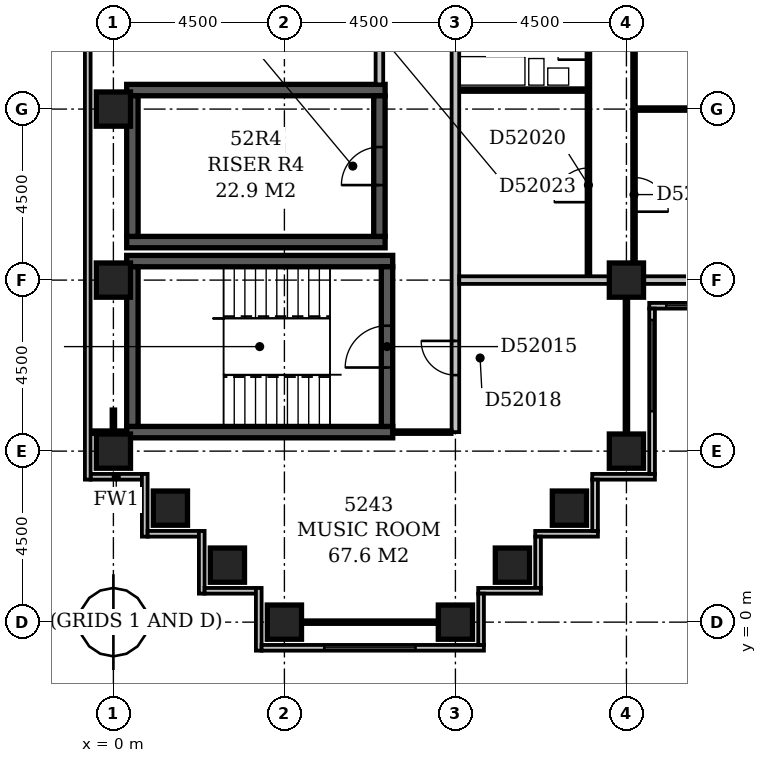
"""IFC4 building model, lengths in metres.
Left out: names, types, materials, properties, quantities, classifications, styles, units other than length and angle.
Written with IfcOpenShell. Run it as: python <this file> out.ifc"""

import sys

from ifc_helpers import new_model, si_unit, direction, frame, frame_2d, origin, origin_2d, place, context, subcontext, project, spatial, rectangle, extrude, element, fill, save


model = new_model("IFC4")
c1 = context("Model", 3, precision=1e-05, world=origin(), true_north=direction((0.0, 1.0)))
c2 = subcontext(c1, "Body", "Model", "MODEL_VIEW")
j1 = project(units=[si_unit("LENGTHUNIT", "METRE"), si_unit("PLANEANGLEUNIT", "RADIAN")], contexts=[c1])
p1 = place(None, origin())
s1 = spatial("IfcSite", under=j1, at=p1, CompositionType="ELEMENT")
p2 = place(p1, origin())
s2 = spatial("IfcBuilding", under=s1, at=p2, CompositionType="ELEMENT")
p3 = place(p2, frame((0.0, 0.0, 204.2)))
s3 = spatial("IfcBuildingStorey", under=s2, at=p3, CompositionType="ELEMENT", Elevation=204.2)
for number, where, z_axis, x_axis in (
    (1, (0.35, 5.0, -0.3), (0.0, 0.0, 1.0), (1.0, 0.0, 0.0)),
    (2, (0.35, 9.5, -0.3), (0.0, 0.0, 1.0), (1.0, 0.0, 0.0)),
):
    element("IfcWall", number, at=place(p3, frame(where, z_axis=z_axis, x_axis=x_axis)), inside=s3, PredefinedType="SHEAR", context=c2, shape_type="SweptSolid", body=[
        extrude(rectangle(XDim=7.0, YDim=0.3, at=frame_2d((3.5, 0.0))), origin(), (0.0, 0.0, 1.0), 3.6),
    ])
for number, where, z_axis, x_axis in (
    (3, (0.35, 10.0, -0.3), (0.0, 0.0, 1.0), (1.0, 0.0, 0.0)),
    (4, (0.35, 14.0, -0.3), (0.0, 0.0, 1.0), (1.0, 0.0, 0.0)),
):
    element("IfcWall", number, at=place(p3, frame(where, z_axis=z_axis, x_axis=x_axis)), inside=s3, PredefinedType="SHEAR", context=c2, shape_type="SweptSolid", body=[
        extrude(rectangle(XDim=6.8, YDim=0.3, at=frame_2d((3.4, 0.0))), origin(), (0.0, 0.0, 1.0), 3.6),
    ])
p4 = place(p3, frame((0.5, 5.15, -0.3), z_axis=(0.0, 0.0, 1.0), x_axis=(0.0, 1.0, 0.0)))
e5 = element("IfcWall", 5, at=p4, inside=s3, PredefinedType="SHEAR", context=c2, shape_type="SweptSolid", body=[
    extrude(rectangle(XDim=4.2, YDim=0.3, at=frame_2d((2.1, 0.0))), origin(), (0.0, 0.0, 1.0), 3.6),
])
p5 = place(p3, frame((0.5, 10.15, -0.3), z_axis=(0.0, 0.0, 1.0), x_axis=(0.0, 1.0, 0.0)))
e6 = element("IfcWall", 6, at=p5, inside=s3, PredefinedType="SHEAR", context=c2, shape_type="SweptSolid", body=[
    extrude(rectangle(XDim=3.7, YDim=0.3, at=frame_2d((1.85, 0.0))), origin(), (0.0, 0.0, 1.0), 3.6),
])
p6 = place(p3, frame((7.0, 10.15, -0.3), z_axis=(0.0, 0.0, 1.0), x_axis=(0.0, 1.0, 0.0)))
e7 = element("IfcWall", 7, at=p6, inside=s3, PredefinedType="SHEAR", context=c2, shape_type="SweptSolid", body=[
    extrude(rectangle(XDim=3.7, YDim=0.3, at=frame_2d((1.85, 0.0))), origin(), (0.0, 0.0, 1.0), 3.6),
])
p7 = place(p6, frame((1.35, 0.0, 0.3)))
e8 = element("IfcOpeningElement", 8, at=p7, cuts=e7, PredefinedType="OPENING", context=c2, shape_type="SweptSolid", body=[
    extrude(rectangle(XDim=1.0, YDim=2.1, at=frame_2d((0.5, 1.05))), frame((0.0, 0.162, 0.0), z_axis=(0.0, -1.0, 0.0), x_axis=(1.0, 0.0, 0.0)), (0.0, 0.0, 1.0), 0.324),
])
p8 = place(p3, frame((7.2, 5.15, -0.3), z_axis=(0.0, 0.0, 1.0), x_axis=(0.0, 1.0, 0.0)))
e9 = element("IfcWall", 9, at=p8, inside=s3, PredefinedType="SHEAR", context=c2, shape_type="SweptSolid", body=[
    extrude(rectangle(XDim=4.2, YDim=0.3, at=frame_2d((2.1, 0.0))), origin(), (0.0, 0.0, 1.0), 3.6),
])
p9 = place(p8, frame((1.55, 0.0, 0.3)))
e10 = element("IfcOpeningElement", 10, at=p9, cuts=e9, PredefinedType="OPENING", context=c2, shape_type="SweptSolid", body=[
    extrude(rectangle(XDim=1.1, YDim=2.1, at=frame_2d((0.55, 1.05))), frame((0.0, 0.162, 0.0), z_axis=(0.0, -1.0, 0.0), x_axis=(1.0, 0.0, 0.0)), (0.0, 0.0, 1.0), 0.324),
])
for number, where, z_axis, x_axis in (
    (11, (4.5, 0.0, -0.3), (0.0, 0.0, 1.0), (1.0, 0.0, 0.0)),
    (12, (9.0, 0.0, -0.3), (0.0, 0.0, 1.0), (1.0, 0.0, 0.0)),
    (13, (3.0, 1.5, -0.3), (0.0, 0.0, 1.0), (1.0, 0.0, 0.0)),
    (14, (10.5, 1.5, -0.3), (0.0, 0.0, 1.0), (1.0, 0.0, 0.0)),
    (15, (1.5, 3.0, -0.3), (0.0, 0.0, 1.0), (1.0, 0.0, 0.0)),
    (16, (12.0, 3.0, -0.3), (0.0, 0.0, 1.0), (1.0, 0.0, 0.0)),
    (17, (0.0, 4.5, -0.3), (0.0, 0.0, 1.0), (1.0, 0.0, 0.0)),
    (18, (13.5, 4.5, -0.3), (0.0, 0.0, 1.0), (1.0, 0.0, 0.0)),
    (19, (0.0, 9.0, -0.3), (0.0, 0.0, 1.0), (1.0, 0.0, 0.0)),
    (20, (13.5, 9.0, -0.3), (0.0, 0.0, 1.0), (1.0, 0.0, 0.0)),
    (21, (0.0, 13.5, -0.3), (0.0, 0.0, 1.0), (1.0, 0.0, 0.0)),
):
    element("IfcColumn", number, at=place(p3, frame(where, z_axis=z_axis, x_axis=x_axis)), inside=s3, PredefinedType="COLUMN", context=c2, shape_type="SweptSolid", body=[
        extrude(rectangle(XDim=0.9, YDim=0.9, at=origin_2d()), origin(), (0.0, 0.0, 1.0), 3.6),
    ])
p10 = place(p3, frame((-0.6, 3.825, 0.0), z_axis=(0.0, 0.0, 1.0), x_axis=(1.0, 0.0, 0.0)))
e22 = element("IfcWall", 22, at=p10, inside=s3, PredefinedType="STANDARD", context=c2, shape_type="SweptSolid", body=[
    extrude(rectangle(XDim=1.35, YDim=0.15, at=frame_2d((0.675, 0.0))), origin(), (0.0, 0.0, 1.0), 2.7),
])
p11 = place(p3, frame((0.825, 3.9, 0.0), z_axis=(0.0, 0.0, 1.0), x_axis=(0.0, -1.0, 0.0)))
e23 = element("IfcWall", 23, at=p11, inside=s3, PredefinedType="STANDARD", context=c2, shape_type="SweptSolid", body=[
    extrude(rectangle(XDim=1.65, YDim=0.15, at=frame_2d((0.825, 0.0))), origin(), (0.0, 0.0, 1.0), 2.7),
])
p12 = place(p3, frame((0.9, 2.325, 0.0), z_axis=(0.0, 0.0, 1.0), x_axis=(1.0, 0.0, 0.0)))
e24 = element("IfcWall", 24, at=p12, inside=s3, PredefinedType="STANDARD", context=c2, shape_type="SweptSolid", body=[
    extrude(rectangle(XDim=1.35, YDim=0.15, at=frame_2d((0.675, 0.0))), origin(), (0.0, 0.0, 1.0), 2.7),
])
p13 = place(p3, frame((2.325, 2.4, 0.0), z_axis=(0.0, 0.0, 1.0), x_axis=(0.0, -1.0, 0.0)))
e25 = element("IfcWall", 25, at=p13, inside=s3, PredefinedType="STANDARD", context=c2, shape_type="SweptSolid", body=[
    extrude(rectangle(XDim=1.65, YDim=0.15, at=frame_2d((0.825, 0.0))), origin(), (0.0, 0.0, 1.0), 2.7),
])
p14 = place(p3, frame((2.4, 0.825, 0.0), z_axis=(0.0, 0.0, 1.0), x_axis=(1.0, 0.0, 0.0)))
e26 = element("IfcWall", 26, at=p14, inside=s3, PredefinedType="STANDARD", context=c2, shape_type="SweptSolid", body=[
    extrude(rectangle(XDim=1.35, YDim=0.15, at=frame_2d((0.675, 0.0))), origin(), (0.0, 0.0, 1.0), 2.7),
])
p15 = place(p3, frame((3.825, 0.9, 0.0), z_axis=(0.0, 0.0, 1.0), x_axis=(0.0, -1.0, 0.0)))
e27 = element("IfcWall", 27, at=p15, inside=s3, PredefinedType="STANDARD", context=c2, shape_type="SweptSolid", body=[
    extrude(rectangle(XDim=1.65, YDim=0.15, at=frame_2d((0.825, 0.0))), origin(), (0.0, 0.0, 1.0), 2.7),
])
p16 = place(p3, frame((3.9, -0.675, 0.0), z_axis=(0.0, 0.0, 1.0), x_axis=(1.0, 0.0, 0.0)))
e28 = element("IfcWall", 28, at=p16, inside=s3, PredefinedType="STANDARD", context=c2, shape_type="SweptSolid", body=[
    extrude(rectangle(XDim=5.85, YDim=0.15, at=frame_2d((2.925, 0.0))), origin(), (0.0, 0.0, 1.0), 2.7),
])
p17 = place(p16, frame((1.65, 0.0, 0.6)))
e29 = element("IfcOpeningElement", 29, at=p17, cuts=e28, PredefinedType="OPENING", context=c2, shape_type="SweptSolid", body=[
    extrude(rectangle(XDim=2.4, YDim=1.8, at=frame_2d((1.2, 0.9))), frame((0.0, 0.087, 0.0), z_axis=(0.0, -1.0, 0.0), x_axis=(1.0, 0.0, 0.0)), (0.0, 0.0, 1.0), 0.174),
])
p18 = place(p3, frame((9.675, -0.6, 0.0), z_axis=(0.0, 0.0, 1.0), x_axis=(0.0, 1.0, 0.0)))
e30 = element("IfcWall", 30, at=p18, inside=s3, PredefinedType="STANDARD", context=c2, shape_type="SweptSolid", body=[
    extrude(rectangle(XDim=1.35, YDim=0.15, at=frame_2d((0.675, 0.0))), origin(), (0.0, 0.0, 1.0), 2.7),
])
p19 = place(p3, frame((9.6, 0.825, 0.0), z_axis=(0.0, 0.0, 1.0), x_axis=(1.0, 0.0, 0.0)))
e31 = element("IfcWall", 31, at=p19, inside=s3, PredefinedType="STANDARD", context=c2, shape_type="SweptSolid", body=[
    extrude(rectangle(XDim=1.65, YDim=0.15, at=frame_2d((0.825, 0.0))), origin(), (0.0, 0.0, 1.0), 2.7),
])
p20 = place(p3, frame((11.175, 0.9, 0.0), z_axis=(0.0, 0.0, 1.0), x_axis=(0.0, 1.0, 0.0)))
e32 = element("IfcWall", 32, at=p20, inside=s3, PredefinedType="STANDARD", context=c2, shape_type="SweptSolid", body=[
    extrude(rectangle(XDim=1.35, YDim=0.15, at=frame_2d((0.675, 0.0))), origin(), (0.0, 0.0, 1.0), 2.7),
])
p21 = place(p3, frame((11.1, 2.325, 0.0), z_axis=(0.0, 0.0, 1.0), x_axis=(1.0, 0.0, 0.0)))
e33 = element("IfcWall", 33, at=p21, inside=s3, PredefinedType="STANDARD", context=c2, shape_type="SweptSolid", body=[
    extrude(rectangle(XDim=1.65, YDim=0.15, at=frame_2d((0.825, 0.0))), origin(), (0.0, 0.0, 1.0), 2.7),
])
p22 = place(p3, frame((12.675, 2.4, 0.0), z_axis=(0.0, 0.0, 1.0), x_axis=(0.0, 1.0, 0.0)))
e34 = element("IfcWall", 34, at=p22, inside=s3, PredefinedType="STANDARD", context=c2, shape_type="SweptSolid", body=[
    extrude(rectangle(XDim=1.35, YDim=0.15, at=frame_2d((0.675, 0.0))), origin(), (0.0, 0.0, 1.0), 2.7),
])
p23 = place(p3, frame((12.6, 3.825, 0.0), z_axis=(0.0, 0.0, 1.0), x_axis=(1.0, 0.0, 0.0)))
e35 = element("IfcWall", 35, at=p23, inside=s3, PredefinedType="STANDARD", context=c2, shape_type="SweptSolid", body=[
    extrude(rectangle(XDim=1.65, YDim=0.15, at=frame_2d((0.825, 0.0))), origin(), (0.0, 0.0, 1.0), 2.7),
])
p24 = place(p3, frame((14.175, 3.9, 0.0), z_axis=(0.0, 0.0, 1.0), x_axis=(0.0, 1.0, 0.0)))
e36 = element("IfcWall", 36, at=p24, inside=s3, PredefinedType="STANDARD", context=c2, shape_type="SweptSolid", body=[
    extrude(rectangle(XDim=4.35, YDim=0.15, at=frame_2d((2.175, 0.0))), origin(), (0.0, 0.0, 1.0), 2.7),
])
p25 = place(p24, frame((1.65, 0.0, 0.6)))
e37 = element("IfcOpeningElement", 37, at=p25, cuts=e36, PredefinedType="OPENING", context=c2, shape_type="SweptSolid", body=[
    extrude(rectangle(XDim=2.4, YDim=1.8, at=frame_2d((1.2, 0.9))), frame((0.0, 0.087, 0.0), z_axis=(0.0, -1.0, 0.0), x_axis=(1.0, 0.0, 0.0)), (0.0, 0.0, 1.0), 0.174),
])
p26 = place(p3, frame((14.1, 8.325, 0.0), z_axis=(0.0, 0.0, 1.0), x_axis=(1.0, 0.0, 0.0)))
e38 = element("IfcWall", 38, at=p26, inside=s3, PredefinedType="STANDARD", context=c2, shape_type="SweptSolid", body=[
    extrude(rectangle(XDim=4.65, YDim=0.15, at=frame_2d((2.325, 0.0))), origin(), (0.0, 0.0, 1.0), 2.7),
])
p27 = place(p26, frame((0.45, 0.0, 0.6)))
e39 = element("IfcOpeningElement", 39, at=p27, cuts=e38, PredefinedType="OPENING", context=c2, shape_type="SweptSolid", body=[
    extrude(rectangle(XDim=2.4, YDim=1.8, at=frame_2d((1.2, 0.9))), frame((0.0, 0.087, 0.0), z_axis=(0.0, -1.0, 0.0), x_axis=(1.0, 0.0, 0.0)), (0.0, 0.0, 1.0), 0.174),
])
p28 = place(p3, frame((-0.675, 59.1, 0.0), z_axis=(0.0, 0.0, 1.0), x_axis=(0.0, -1.0, 0.0)))
e40 = element("IfcWall", 40, at=p28, inside=s3, PredefinedType="STANDARD", context=c2, shape_type="SweptSolid", body=[
    extrude(rectangle(XDim=55.35, YDim=0.15, at=frame_2d((27.675, 0.0))), origin(), (0.0, 0.0, 1.0), 2.7),
])
p29 = place(p3, frame((4.95, 0.0, 0.0), z_axis=(0.0, 0.0, 1.0), x_axis=(1.0, 0.0, 0.0)))
e41 = element("IfcWall", 41, at=p29, inside=s3, PredefinedType="PARTITIONING", context=c2, shape_type="SweptSolid", body=[
    extrude(rectangle(XDim=3.6, YDim=0.1, at=frame_2d((1.8, 0.0))), origin(), (0.0, 0.0, 1.0), 2.7),
])
p30 = place(p3, frame((0.0, 4.95, 0.0), z_axis=(0.0, 0.0, 1.0), x_axis=(0.0, 1.0, 0.0)))
e42 = element("IfcWall", 42, at=p30, inside=s3, PredefinedType="PARTITIONING", context=c2, shape_type="SweptSolid", body=[
    extrude(rectangle(XDim=0.65, YDim=0.1, at=frame_2d((0.325, 0.0))), origin(), (0.0, 0.0, 1.0), 2.7),
])
p31 = place(p3, frame((13.5, 4.95, 0.0), z_axis=(0.0, 0.0, 1.0), x_axis=(0.0, 1.0, 0.0)))
e43 = element("IfcWall", 43, at=p31, inside=s3, PredefinedType="PARTITIONING", context=c2, shape_type="SweptSolid", body=[
    extrude(rectangle(XDim=3.6, YDim=0.1, at=frame_2d((1.8, 0.0))), origin(), (0.0, 0.0, 1.0), 2.7),
])
p32 = place(p3, frame((-0.6, 5.0, 0.0), z_axis=(0.0, 0.0, 1.0), x_axis=(1.0, 0.0, 0.0)))
e44 = element("IfcWall", 44, at=p32, inside=s3, PredefinedType="PARTITIONING", context=c2, shape_type="SweptSolid", body=[
    extrude(rectangle(XDim=0.951, YDim=0.1, at=frame_2d((0.476, 0.0))), origin(), (0.0, 0.0, 1.0), 3.3),
])
p33 = place(p3, frame((7.349, 5.0, 0.0), z_axis=(0.0, 0.0, 1.0), x_axis=(1.0, 0.0, 0.0)))
e45 = element("IfcWall", 45, at=p33, inside=s3, PredefinedType="PARTITIONING", context=c2, shape_type="SweptSolid", body=[
    extrude(rectangle(XDim=1.551, YDim=0.1, at=frame_2d((0.775, 0.0))), origin(), (0.0, 0.0, 1.0), 3.3),
])
p34 = place(p3, frame((9.0, 5.0, 0.0), z_axis=(0.0, 0.0, 1.0), x_axis=(0.0, 1.0, 0.0)))
e46 = element("IfcWall", 46, at=p34, inside=s3, PredefinedType="PARTITIONING", context=c2, shape_type="SweptSolid", body=[
    extrude(rectangle(XDim=31.0, YDim=0.2, at=frame_2d((15.5, 0.0))), origin(), (0.0, 0.0, 1.0), 3.3),
])
p35 = place(p34, frame((18.4, 0.0, 0.0)))
e47 = element("IfcOpeningElement", 47, at=p35, cuts=e46, PredefinedType="OPENING", context=c2, shape_type="SweptSolid", body=[
    extrude(rectangle(XDim=1.0, YDim=2.1, at=frame_2d((0.5, 1.05))), frame((0.0, 0.112, 0.0), z_axis=(0.0, -1.0, 0.0), x_axis=(1.0, 0.0, 0.0)), (0.0, 0.0, 1.0), 0.224),
])
p36 = place(p34, frame((11.7, 0.0, 0.0)))
e48 = element("IfcOpeningElement", 48, at=p36, cuts=e46, PredefinedType="OPENING", context=c2, shape_type="SweptSolid", body=[
    extrude(rectangle(XDim=1.0, YDim=2.1, at=frame_2d((0.5, 1.05))), frame((0.0, 0.112, 0.0), z_axis=(0.0, -1.0, 0.0), x_axis=(1.0, 0.0, 0.0)), (0.0, 0.0, 1.0), 0.224),
])
p37 = place(p34, frame((1.5, 0.0, 0.0)))
e49 = element("IfcOpeningElement", 49, at=p37, cuts=e46, PredefinedType="OPENING", context=c2, shape_type="SweptSolid", body=[
    extrude(rectangle(XDim=0.9, YDim=2.1, at=frame_2d((0.45, 1.05))), frame((0.0, 0.112, 0.0), z_axis=(0.0, -1.0, 0.0), x_axis=(1.0, 0.0, 0.0)), (0.0, 0.0, 1.0), 0.224),
])
p38 = place(p3, frame((9.1, 9.0, 0.0), z_axis=(0.0, 0.0, 1.0), x_axis=(1.0, 0.0, 0.0)))
e50 = element("IfcWall", 50, at=p38, inside=s3, PredefinedType="PARTITIONING", context=c2, shape_type="SweptSolid", body=[
    extrude(rectangle(XDim=3.95, YDim=0.2, at=frame_2d((1.975, 0.0))), origin(), (0.0, 0.0, 1.0), 3.3),
])
p39 = place(p3, frame((13.95, 9.0, 0.0), z_axis=(0.0, 0.0, 1.0), x_axis=(1.0, 0.0, 0.0)))
e51 = element("IfcWall", 51, at=p39, inside=s3, PredefinedType="PARTITIONING", context=c2, shape_type="SweptSolid", body=[
    extrude(rectangle(XDim=3.6, YDim=0.2, at=frame_2d((1.8, 0.0))), origin(), (0.0, 0.0, 1.0), 2.7),
])
p40 = place(p3, frame((12.5, 9.1, 0.0), z_axis=(0.0, 0.0, 1.0), x_axis=(0.0, 1.0, 0.0)))
e52 = element("IfcWall", 52, at=p40, inside=s3, PredefinedType="PARTITIONING", context=c2, shape_type="SweptSolid", body=[
    extrude(rectangle(XDim=7.3, YDim=0.1, at=frame_2d((3.65, 0.0))), origin(), (0.0, 0.0, 1.0), 3.3),
])
p41 = place(p40, frame((5.7, 0.0, 0.0)))
e53 = element("IfcOpeningElement", 53, at=p41, cuts=e52, PredefinedType="OPENING", context=c2, shape_type="SweptSolid", body=[
    extrude(rectangle(XDim=0.8, YDim=2.1, at=frame_2d((0.4, 1.05))), frame((0.0, 0.062, 0.0), z_axis=(0.0, -1.0, 0.0), x_axis=(1.0, 0.0, 0.0)), (0.0, 0.0, 1.0), 0.124),
])
p42 = place(p40, frame((1.95, 0.0, 0.0)))
e54 = element("IfcOpeningElement", 54, at=p42, cuts=e52, PredefinedType="OPENING", context=c2, shape_type="SweptSolid", body=[
    extrude(rectangle(XDim=0.9, YDim=2.1, at=frame_2d((0.45, 1.05))), frame((0.0, 0.062, 0.0), z_axis=(0.0, -1.0, 0.0), x_axis=(1.0, 0.0, 0.0)), (0.0, 0.0, 1.0), 0.124),
])
p43 = place(p3, frame((13.7, 9.45, 0.0), z_axis=(0.0, 0.0, 1.0), x_axis=(0.0, 1.0, 0.0)))
e55 = element("IfcWall", 55, at=p43, inside=s3, PredefinedType="PARTITIONING", context=c2, shape_type="SweptSolid", body=[
    extrude(rectangle(XDim=8.45, YDim=0.1, at=frame_2d((4.225, 0.0))), origin(), (0.0, 0.0, 1.0), 3.3),
])
p44 = place(p43, frame((1.35, 0.0, 0.0)))
e56 = element("IfcOpeningElement", 56, at=p44, cuts=e55, PredefinedType="OPENING", context=c2, shape_type="SweptSolid", body=[
    extrude(rectangle(XDim=0.9, YDim=2.1, at=frame_2d((0.45, 1.05))), frame((0.0, 0.062, 0.0), z_axis=(0.0, -1.0, 0.0), x_axis=(1.0, 0.0, 0.0)), (0.0, 0.0, 1.0), 0.124),
])
p45 = place(p43, frame((5.85, 0.0, 0.0)))
e57 = element("IfcOpeningElement", 57, at=p45, cuts=e55, PredefinedType="OPENING", context=c2, shape_type="SweptSolid", body=[
    extrude(rectangle(XDim=0.9, YDim=2.1, at=frame_2d((0.45, 1.05))), frame((0.0, 0.062, 0.0), z_axis=(0.0, -1.0, 0.0), x_axis=(1.0, 0.0, 0.0)), (0.0, 0.0, 1.0), 0.124),
])
p46 = place(p3, frame((13.75, 13.5, 0.0), z_axis=(0.0, 0.0, 1.0), x_axis=(1.0, 0.0, 0.0)))
e58 = element("IfcWall", 58, at=p46, inside=s3, PredefinedType="PARTITIONING", context=c2, shape_type="SweptSolid", body=[
    extrude(rectangle(XDim=3.8, YDim=0.1, at=frame_2d((1.9, 0.0))), origin(), (0.0, 0.0, 1.0), 3.3),
])
p47 = place(p3, frame((9.1, 14.0, 0.0), z_axis=(0.0, 0.0, 1.0), x_axis=(1.0, 0.0, 0.0)))
e59 = element("IfcWall", 59, at=p47, inside=s3, PredefinedType="PLUMBINGWALL", context=c2, shape_type="SweptSolid", body=[
    extrude(rectangle(XDim=3.35, YDim=0.1, at=frame_2d((1.675, 0.0))), origin(), (0.0, 0.0, 1.0), 3.3),
])
p48 = place(p3, frame((7.0, 14.15, 0.0), z_axis=(0.0, 0.0, 1.0), x_axis=(0.0, 1.0, 0.0)))
e60 = element("IfcWall", 60, at=p48, inside=s3, PredefinedType="PARTITIONING", context=c2, shape_type="SweptSolid", body=[
    extrude(rectangle(XDim=4.2, YDim=0.2, at=frame_2d((2.1, 0.0))), origin(), (0.0, 0.0, 1.0), 3.3),
])
p49 = place(p48, frame((1.6, 0.0, 0.0)))
e61 = element("IfcOpeningElement", 61, at=p49, cuts=e60, PredefinedType="OPENING", context=c2, shape_type="SweptSolid", body=[
    extrude(rectangle(XDim=1.0, YDim=2.1, at=frame_2d((0.5, 1.05))), frame((0.0, 0.112, 0.0), z_axis=(0.0, -1.0, 0.0), x_axis=(1.0, 0.0, 0.0)), (0.0, 0.0, 1.0), 0.224),
])
p50 = place(p17, origin())
e62 = element("IfcWindow", 62, at=p50, inside=s3, PartitioningType="SINGLE_PANEL", PredefinedType="WINDOW", context=c2, shape_type="SweptSolid", body=[
    extrude(rectangle(XDim=2.4, YDim=1.8, at=frame_2d((1.2, 0.9))), frame((0.0, 0.03, 0.0), z_axis=(0.0, -1.0, 0.0), x_axis=(1.0, 0.0, 0.0)), (0.0, 0.0, 1.0), 0.06),
])
fill(e29, e62)
p51 = place(p25, origin())
e63 = element("IfcWindow", 63, at=p51, inside=s3, PartitioningType="SINGLE_PANEL", PredefinedType="WINDOW", context=c2, shape_type="SweptSolid", body=[
    extrude(rectangle(XDim=2.4, YDim=1.8, at=frame_2d((1.2, 0.9))), frame((0.0, 0.03, 0.0), z_axis=(0.0, -1.0, 0.0), x_axis=(1.0, 0.0, 0.0)), (0.0, 0.0, 1.0), 0.06),
])
fill(e37, e63)
p52 = place(p27, origin())
e64 = element("IfcWindow", 64, at=p52, inside=s3, PartitioningType="SINGLE_PANEL", PredefinedType="WINDOW", context=c2, shape_type="SweptSolid", body=[
    extrude(rectangle(XDim=2.4, YDim=1.8, at=frame_2d((1.2, 0.9))), frame((0.0, 0.03, 0.0), z_axis=(0.0, -1.0, 0.0), x_axis=(1.0, 0.0, 0.0)), (0.0, 0.0, 1.0), 0.06),
])
fill(e39, e64)
p53 = place(p7, origin())
e65 = element("IfcDoor", 65, at=p53, inside=s3, OperationType="SINGLE_SWING_LEFT", PredefinedType="DOOR", context=c2, shape_type="SweptSolid", body=[
    extrude(rectangle(XDim=1.0, YDim=2.1, at=frame_2d((0.5, 1.05))), frame((0.0, 0.025, 0.0), z_axis=(0.0, -1.0, 0.0), x_axis=(1.0, 0.0, 0.0)), (0.0, 0.0, 1.0), 0.05),
])
fill(e8, e65)
p54 = place(p9, origin())
e66 = element("IfcDoor", 66, at=p54, inside=s3, OperationType="SINGLE_SWING_LEFT", PredefinedType="DOOR", context=c2, shape_type="SweptSolid", body=[
    extrude(rectangle(XDim=1.1, YDim=2.1, at=frame_2d((0.55, 1.05))), frame((0.0, 0.025, 0.0), z_axis=(0.0, -1.0, 0.0), x_axis=(1.0, 0.0, 0.0)), (0.0, 0.0, 1.0), 0.05),
])
fill(e10, e66)
p55 = place(p37, frame((0.9, 0.0, 0.0), z_axis=(0.0, 0.0, 1.0), x_axis=(-1.0, 0.0, 0.0)))
e67 = element("IfcDoor", 67, at=p55, inside=s3, OperationType="SINGLE_SWING_LEFT", PredefinedType="DOOR", context=c2, shape_type="SweptSolid", body=[
    extrude(rectangle(XDim=0.9, YDim=2.1, at=frame_2d((0.45, 1.05))), frame((0.0, 0.025, 0.0), z_axis=(0.0, -1.0, 0.0), x_axis=(1.0, 0.0, 0.0)), (0.0, 0.0, 1.0), 0.05),
])
fill(e49, e67)
p56 = place(p41, origin())
e68 = element("IfcDoor", 68, at=p56, inside=s3, OperationType="SINGLE_SWING_LEFT", PredefinedType="DOOR", context=c2, shape_type="SweptSolid", body=[
    extrude(rectangle(XDim=0.8, YDim=2.1, at=frame_2d((0.4, 1.05))), frame((0.0, 0.025, 0.0), z_axis=(0.0, -1.0, 0.0), x_axis=(1.0, 0.0, 0.0)), (0.0, 0.0, 1.0), 0.05),
])
fill(e53, e68)
p57 = place(p42, origin())
e69 = element("IfcDoor", 69, at=p57, inside=s3, OperationType="SINGLE_SWING_LEFT", PredefinedType="DOOR", context=c2, shape_type="SweptSolid", body=[
    extrude(rectangle(XDim=0.9, YDim=2.1, at=frame_2d((0.45, 1.05))), frame((0.0, 0.025, 0.0), z_axis=(0.0, -1.0, 0.0), x_axis=(1.0, 0.0, 0.0)), (0.0, 0.0, 1.0), 0.05),
])
fill(e54, e69)
p58 = place(p44, frame((0.9, 0.0, 0.0), z_axis=(0.0, 0.0, 1.0), x_axis=(-1.0, 0.0, 0.0)))
e70 = element("IfcDoor", 70, at=p58, inside=s3, OperationType="SINGLE_SWING_RIGHT", PredefinedType="DOOR", context=c2, shape_type="SweptSolid", body=[
    extrude(rectangle(XDim=0.9, YDim=2.1, at=frame_2d((0.45, 1.05))), frame((0.0, 0.025, 0.0), z_axis=(0.0, -1.0, 0.0), x_axis=(1.0, 0.0, 0.0)), (0.0, 0.0, 1.0), 0.05),
])
fill(e56, e70)
save(model, sys.argv[1])
